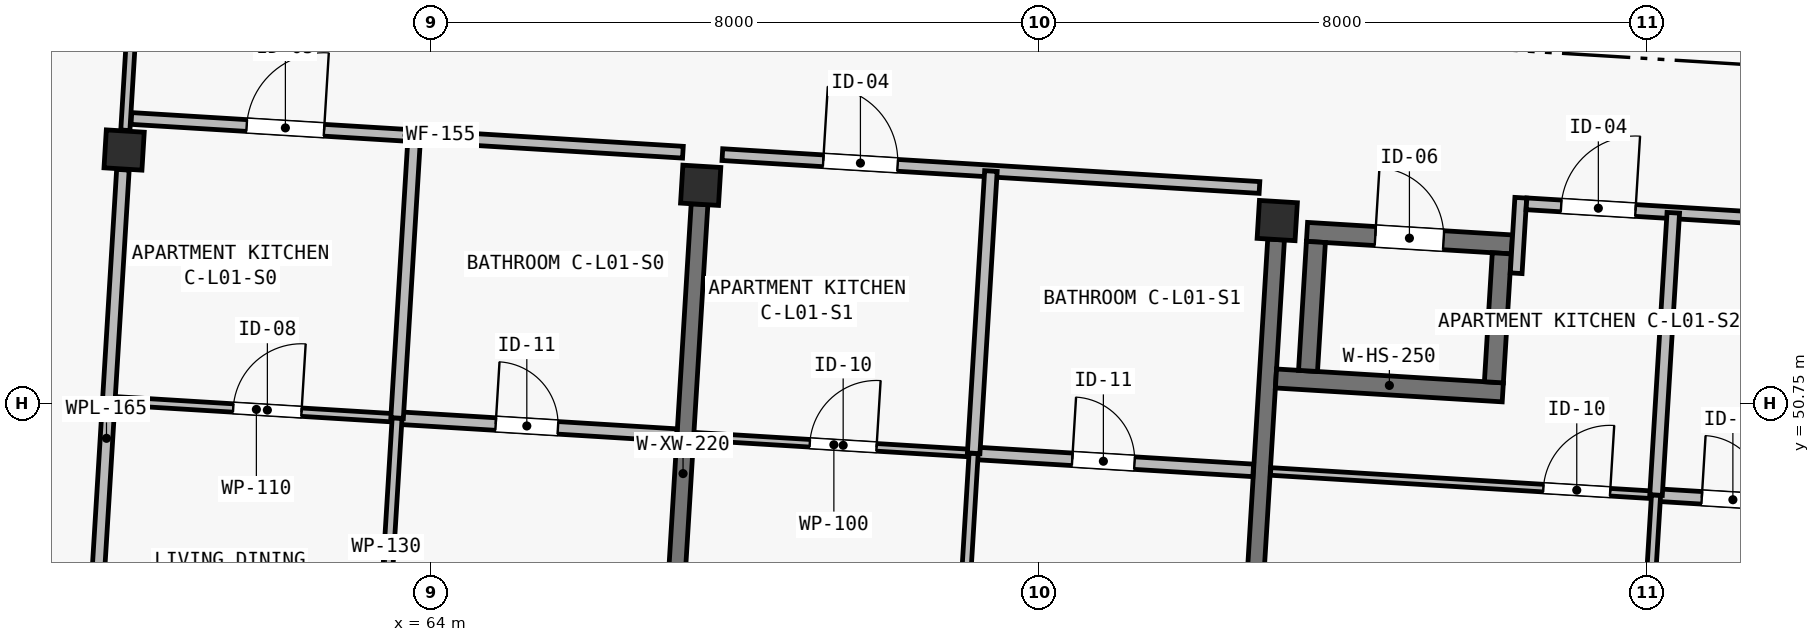
"""IFC4 building model, lengths in metres.
Left out: names, types, materials, properties, quantities, classifications, styles, units other than length and angle.
Written with IfcOpenShell. Run it as: python <this file> out.ifc"""

import sys

from ifc_helpers import new_model, si_unit, direction, frame, frame_2d, origin, origin_2d, place, context, subcontext, project, spatial, rectangle, extrude, element, fill, save


model = new_model("IFC4")
c1 = context("Model", 3, precision=1e-05, world=origin(), true_north=direction((0.0, 1.0)))
c2 = subcontext(c1, "Body", "Model", "MODEL_VIEW")
j1 = project(units=[si_unit("LENGTHUNIT", "METRE"), si_unit("PLANEANGLEUNIT", "RADIAN")], contexts=[c1])
p1 = place(None, origin())
s1 = spatial("IfcSite", under=j1, at=p1, CompositionType="ELEMENT")
p2 = place(p1, origin())
s2 = spatial("IfcBuilding", under=s1, at=p2, CompositionType="ELEMENT")
p3 = place(p2, frame((0.0, 0.0, 4.5)))
s3 = spatial("IfcBuildingStorey", under=s2, at=p3, CompositionType="ELEMENT", Elevation=4.5)
for number, where, z_axis, x_axis in (
    (1, (59.964, 54.086, 0.0), (0.0, 0.0, 1.0), (0.998, -0.061, 0.0)),
    (2, (67.55, 53.622, 0.0), (0.0, 0.0, 1.0), (0.998, -0.061, 0.0)),
    (3, (75.135, 53.158, 0.0), (0.0, 0.0, 1.0), (0.998, -0.061, 0.0)),
):
    element("IfcColumn", number, at=place(p3, frame(where, z_axis=z_axis, x_axis=x_axis)), inside=s3, PredefinedType="COLUMN", context=c2, shape_type="SweptSolid", body=[
        extrude(rectangle(XDim=0.5, YDim=0.5, at=origin_2d()), origin(), (0.0, 0.0, 1.0), 3.9),
    ])
p4 = place(p3, frame((67.101, 46.286, -0.25), z_axis=(0.0, 0.0, 1.0), x_axis=(0.061035953884, 0.998135568114, 0.0)))
e4 = element("IfcWall", 4, at=p4, inside=s3, PredefinedType="SHEAR", context=c2, shape_type="SweptSolid", body=[
    extrude(rectangle(XDim=7.1, YDim=0.22, at=frame_2d((3.55, 0.0))), origin(), (0.0, 0.0, 1.0), 3.4),
])
p5 = place(p3, frame((74.687, 45.822, -0.25), z_axis=(0.0, 0.0, 1.0), x_axis=(0.061033859059, 0.99813569621, 0.0)))
e5 = element("IfcWall", 5, at=p5, inside=s3, PredefinedType="SHEAR", context=c2, shape_type="SweptSolid", body=[
    extrude(rectangle(XDim=7.1, YDim=0.22, at=frame_2d((3.55, 0.0))), origin(), (0.0, 0.0, 1.0), 3.4),
])
p6 = place(p3, frame((75.119, 51.08, 0.0), z_axis=(0.0, 0.0, 1.0), x_axis=(0.998133370443, -0.061071882298, 0.0)))
e6 = element("IfcWall", 6, at=p6, inside=s3, PredefinedType="SHEAR", context=c2, shape_type="SweptSolid", body=[
    extrude(rectangle(XDim=2.99, YDim=0.25, at=frame_2d((1.495, 0.0))), origin(), (0.0, 0.0, 1.0), 3.9),
])
p7 = place(p3, frame((75.527, 53.009, 0.0), z_axis=(0.0, 0.0, 1.0), x_axis=(0.998129907752, -0.061128448781, 0.0)))
e7 = element("IfcWall", 7, at=p7, inside=s3, PredefinedType="SHEAR", context=c2, shape_type="SweptSolid", body=[
    extrude(rectangle(XDim=2.7, YDim=0.25, at=frame_2d((1.35, 0.0))), origin(), (0.0, 0.0, 1.0), 3.9),
])
p8 = place(p7, frame((0.9, 0.0, 0.0)))
e8 = element("IfcOpeningElement", 8, at=p8, cuts=e7, PredefinedType="OPENING", context=c2, shape_type="SweptSolid", body=[
    extrude(rectangle(XDim=0.9, YDim=2.05, at=frame_2d((0.45, 1.025))), frame((0.0, 0.14, 0.0), z_axis=(0.0, -1.0, 0.0), x_axis=(1.0, 0.0, 0.0)), (0.0, 0.0, 1.0), 0.28),
])
p9 = place(p3, frame((75.541, 51.179, 0.0), z_axis=(0.0, 0.0, 1.0), x_axis=(0.061037062968, 0.998135500293, 0.0)))
e9 = element("IfcWall", 9, at=p9, inside=s3, PredefinedType="SHEAR", context=c2, shape_type="SweptSolid", body=[
    extrude(rectangle(XDim=1.7, YDim=0.25, at=frame_2d((0.85, 0.0))), origin(), (0.0, 0.0, 1.0), 3.9),
])
p10 = place(p3, frame((77.986, 51.03, 0.0), z_axis=(0.0, 0.0, 1.0), x_axis=(0.061028314627, 0.998136035225, 0.0)))
e10 = element("IfcWall", 10, at=p10, inside=s3, PredefinedType="SHEAR", context=c2, shape_type="SweptSolid", body=[
    extrude(rectangle(XDim=1.7, YDim=0.25, at=frame_2d((0.85, 0.0))), origin(), (0.0, 0.0, 1.0), 3.9),
])
p11 = place(p3, frame((51.654, 49.585, 0.0), z_axis=(0.0, 0.0, 1.0), x_axis=(0.448621989068, 0.893721607059, 0.0)))
e11 = element("IfcWall", 11, at=p11, inside=s3, PredefinedType="SOLIDWALL", context=c2, shape_type="SweptSolid", body=[
    extrude(rectangle(XDim=19.061, YDim=0.26, at=frame_2d((9.53, 0.0))), origin(), (0.0, 0.0, 1.0), 3.65),
])
p12 = place(p11, frame((2.63, 0.0, 0.52)))
e12 = element("IfcOpeningElement", 12, at=p12, cuts=e11, PredefinedType="OPENING", context=c2, shape_type="SweptSolid", body=[
    extrude(rectangle(XDim=0.58, YDim=2.16, at=frame_2d((0.29, 1.08))), frame((0.0, 0.145, 0.0), z_axis=(0.0, -1.0, 0.0), x_axis=(1.0, 0.0, 0.0)), (0.0, 0.0, 1.0), 0.29),
])
p13 = place(p11, frame((15.35, 0.0, 0.45)))
e13 = element("IfcOpeningElement", 13, at=p13, cuts=e11, PredefinedType="OPENING", context=c2, shape_type="SweptSolid", body=[
    extrude(rectangle(XDim=0.72, YDim=2.16, at=frame_2d((0.36, 1.08))), frame((0.0, 0.145, 0.0), z_axis=(0.0, -1.0, 0.0), x_axis=(1.0, 0.0, 0.0)), (0.0, 0.0, 1.0), 0.29),
])
p14 = place(p3, frame((59.98, 54.345, 0.0), z_axis=(0.0, 0.0, 1.0), x_axis=(0.061101107425, 0.998131581843, 0.0)))
e14 = element("IfcWall", 14, at=p14, inside=s3, PredefinedType="PARTITIONING", context=c2, shape_type="SweptSolid", body=[
    extrude(rectangle(XDim=3.88, YDim=0.12, at=frame_2d((1.94, 0.0))), origin(), (0.0, 0.0, 1.0), 3.15),
])
p15 = place(p14, frame((1.35, 0.0, 0.0)))
e15 = element("IfcOpeningElement", 15, at=p15, cuts=e14, PredefinedType="OPENING", context=c2, shape_type="SweptSolid", body=[
    extrude(rectangle(XDim=0.88, YDim=2.1, at=frame_2d((0.44, 1.05))), frame((0.0, 0.075, 0.0), z_axis=(0.0, -1.0, 0.0), x_axis=(1.0, 0.0, 0.0)), (0.0, 0.0, 1.0), 0.15),
])
p16 = place(p3, frame((59.516, 46.76, 0.0), z_axis=(0.0, 0.0, 1.0), x_axis=(0.061034344288, 0.998135666539, 0.0)))
e16 = element("IfcWall", 16, at=p16, inside=s3, PredefinedType="PLUMBINGWALL", context=c2, shape_type="SweptSolid", body=[
    extrude(rectangle(XDim=7.08, YDim=0.165, at=frame_2d((3.54, 0.0))), origin(), (0.0, 0.0, 1.0), 3.15),
])
p17 = place(p3, frame((60.06, 54.501, 0.0), z_axis=(0.0, 0.0, 1.0), x_axis=(0.998134543433, -0.06105270843, 0.0)))
e17 = element("IfcWall", 17, at=p17, inside=s3, PredefinedType="PARTITIONING", context=c2, shape_type="SweptSolid", body=[
    extrude(rectangle(XDim=7.27, YDim=0.155, at=frame_2d((3.635, 0.0))), origin(), (0.0, 0.0, 1.0), 3.62),
])
p18 = place(p17, frame((1.52, 0.0, 0.0)))
e18 = element("IfcOpeningElement", 18, at=p18, cuts=e17, PredefinedType="OPENING", context=c2, shape_type="SweptSolid", body=[
    extrude(rectangle(XDim=1.02, YDim=2.2, at=frame_2d((0.51, 1.1))), frame((0.0, 0.093, 0.0), z_axis=(0.0, -1.0, 0.0), x_axis=(1.0, 0.0, 0.0)), (0.0, 0.0, 1.0), 0.185),
])
p19 = place(p3, frame((59.852, 50.786, 0.0), z_axis=(0.0, 0.0, 1.0), x_axis=(0.998137662841, -0.061001688651, 0.0)))
e19 = element("IfcWall", 19, at=p19, inside=s3, PredefinedType="PARTITIONING", context=c2, shape_type="SweptSolid", body=[
    extrude(rectangle(XDim=3.71, YDim=0.11, at=frame_2d((1.855, 0.0))), origin(), (0.0, 0.0, 1.0), 3.62),
])
p20 = place(p19, frame((1.55, 0.0, 0.0)))
e20 = element("IfcOpeningElement", 20, at=p20, cuts=e19, PredefinedType="OPENING", context=c2, shape_type="SweptSolid", body=[
    extrude(rectangle(XDim=0.9, YDim=2.1, at=frame_2d((0.45, 1.05))), frame((0.0, 0.07, 0.0), z_axis=(0.0, -1.0, 0.0), x_axis=(1.0, 0.0, 0.0)), (0.0, 0.0, 1.0), 0.14),
])
p21 = place(p3, frame((63.555, 50.56, 0.0), z_axis=(0.0, 0.0, 1.0), x_axis=(0.998132682596, -0.061083123148, 0.0)))
e21 = element("IfcWall", 21, at=p21, inside=s3, PredefinedType="PLUMBINGWALL", context=c2, shape_type="SweptSolid", body=[
    extrude(rectangle(XDim=3.685, YDim=0.165, at=frame_2d((1.843, 0.0))), origin(), (0.0, 0.0, 1.0), 3.62),
])
p22 = place(p21, frame((1.3, 0.0, 0.0)))
e22 = element("IfcOpeningElement", 22, at=p22, cuts=e21, PredefinedType="OPENING", context=c2, shape_type="SweptSolid", body=[
    extrude(rectangle(XDim=0.82, YDim=2.08, at=frame_2d((0.41, 1.04))), frame((0.0, 0.097, 0.0), z_axis=(0.0, -1.0, 0.0), x_axis=(1.0, 0.0, 0.0)), (0.0, 0.0, 1.0), 0.195),
])
p23 = place(p3, frame((63.269, 45.879, 0.0), z_axis=(0.0, 0.0, 1.0), x_axis=(0.061059262019, 0.998134142549, 0.0)))
e23 = element("IfcWall", 23, at=p23, inside=s3, PredefinedType="PARTITIONING", context=c2, shape_type="SweptSolid", body=[
    extrude(rectangle(XDim=4.69, YDim=0.13, at=frame_2d((2.345, 0.0))), origin(), (0.0, 0.0, 1.0), 3.62),
])
p24 = place(p23, frame((1.35, 0.0, 0.0)))
e24 = element("IfcOpeningElement", 24, at=p24, cuts=e23, PredefinedType="OPENING", context=c2, shape_type="SweptSolid", body=[
    extrude(rectangle(XDim=0.88, YDim=2.1, at=frame_2d((0.44, 1.05))), frame((0.0, 0.08, 0.0), z_axis=(0.0, -1.0, 0.0), x_axis=(1.0, 0.0, 0.0)), (0.0, 0.0, 1.0), 0.16),
])
p25 = place(p3, frame((63.555, 50.56, 0.0), z_axis=(0.0, 0.0, 1.0), x_axis=(0.061038003798, 0.998135442759, 0.0)))
e25 = element("IfcWall", 25, at=p25, inside=s3, PredefinedType="PLUMBINGWALL", context=c2, shape_type="SweptSolid", body=[
    extrude(rectangle(XDim=3.72, YDim=0.165, at=frame_2d((1.86, 0.0))), origin(), (0.0, 0.0, 1.0), 3.62),
])
p26 = place(p3, frame((67.835, 54.025, 0.0), z_axis=(0.0, 0.0, 1.0), x_axis=(0.998135666539, -0.061034344288, 0.0)))
e26 = element("IfcWall", 26, at=p26, inside=s3, PredefinedType="PARTITIONING", context=c2, shape_type="SweptSolid", body=[
    extrude(rectangle(XDim=7.08, YDim=0.155, at=frame_2d((3.54, 0.0))), origin(), (0.0, 0.0, 1.0), 3.62),
])
p27 = place(p26, frame((1.33, 0.0, 0.0)))
e27 = element("IfcOpeningElement", 27, at=p27, cuts=e26, PredefinedType="OPENING", context=c2, shape_type="SweptSolid", body=[
    extrude(rectangle(XDim=0.98, YDim=2.15, at=frame_2d((0.49, 1.075))), frame((0.0, 0.093, 0.0), z_axis=(0.0, -1.0, 0.0), x_axis=(1.0, 0.0, 0.0)), (0.0, 0.0, 1.0), 0.185),
])
p28 = place(p3, frame((67.463, 50.321, 0.0), z_axis=(0.0, 0.0, 1.0), x_axis=(0.998132682596, -0.061083123148, 0.0)))
e28 = element("IfcWall", 28, at=p28, inside=s3, PredefinedType="PARTITIONING", context=c2, shape_type="SweptSolid", body=[
    extrude(rectangle(XDim=3.685, YDim=0.1, at=frame_2d((1.843, 0.0))), origin(), (0.0, 0.0, 1.0), 3.62),
])
p29 = place(p28, frame((1.525, 0.0, 0.0)))
e29 = element("IfcOpeningElement", 29, at=p29, cuts=e28, PredefinedType="OPENING", context=c2, shape_type="SweptSolid", body=[
    extrude(rectangle(XDim=0.88, YDim=2.1, at=frame_2d((0.44, 1.05))), frame((0.0, 0.065, 0.0), z_axis=(0.0, -1.0, 0.0), x_axis=(1.0, 0.0, 0.0)), (0.0, 0.0, 1.0), 0.13),
])
p30 = place(p3, frame((71.141, 50.096, 0.0), z_axis=(0.0, 0.0, 1.0), x_axis=(0.998136472989, -0.061021154439, 0.0)))
e30 = element("IfcWall", 30, at=p30, inside=s3, PredefinedType="PLUMBINGWALL", context=c2, shape_type="SweptSolid", body=[
    extrude(rectangle(XDim=3.685, YDim=0.165, at=frame_2d((1.842, 0.0))), origin(), (0.0, 0.0, 1.0), 3.62),
])
p31 = place(p30, frame((1.3, 0.0, 0.0)))
e31 = element("IfcOpeningElement", 31, at=p31, cuts=e30, PredefinedType="OPENING", context=c2, shape_type="SweptSolid", body=[
    extrude(rectangle(XDim=0.82, YDim=2.08, at=frame_2d((0.41, 1.04))), frame((0.0, 0.097, 0.0), z_axis=(0.0, -1.0, 0.0), x_axis=(1.0, 0.0, 0.0)), (0.0, 0.0, 1.0), 0.195),
])
p32 = place(p3, frame((70.855, 45.415, 0.0), z_axis=(0.0, 0.0, 1.0), x_axis=(0.061062434628, 0.998133948465, 0.0)))
e32 = element("IfcWall", 32, at=p32, inside=s3, PredefinedType="PARTITIONING", context=c2, shape_type="SweptSolid", body=[
    extrude(rectangle(XDim=4.69, YDim=0.12, at=frame_2d((2.345, 0.0))), origin(), (0.0, 0.0, 1.0), 3.62),
])
p33 = place(p32, frame((1.35, 0.0, 0.0)))
e33 = element("IfcOpeningElement", 33, at=p33, cuts=e32, PredefinedType="OPENING", context=c2, shape_type="SweptSolid", body=[
    extrude(rectangle(XDim=0.9, YDim=2.1, at=frame_2d((0.45, 1.05))), frame((0.0, 0.075, 0.0), z_axis=(0.0, -1.0, 0.0), x_axis=(1.0, 0.0, 0.0)), (0.0, 0.0, 1.0), 0.15),
])
p34 = place(p3, frame((71.141, 50.096, 0.0), z_axis=(0.0, 0.0, 1.0), x_axis=(0.061034005467, 0.998135687257, 0.0)))
e34 = element("IfcWall", 34, at=p34, inside=s3, PredefinedType="PLUMBINGWALL", context=c2, shape_type="SweptSolid", body=[
    extrude(rectangle(XDim=3.72, YDim=0.165, at=frame_2d((1.86, 0.0))), origin(), (0.0, 0.0, 1.0), 3.62),
])
p35 = place(p3, frame((78.279, 52.465, 0.0), z_axis=(0.0, 0.0, 1.0), x_axis=(0.061095097219, 0.998131949742, 0.0)))
e35 = element("IfcWall", 35, at=p35, inside=s3, PredefinedType="PARTITIONING", context=c2, shape_type="SweptSolid", body=[
    extrude(rectangle(XDim=0.995, YDim=0.155, at=frame_2d((0.498, 0.0))), origin(), (0.0, 0.0, 1.0), 3.62),
])
p36 = place(p3, frame((78.415, 53.378, 0.0), z_axis=(0.0, 0.0, 1.0), x_axis=(0.998131852862, -0.061096679962, 0.0)))
e36 = element("IfcWall", 36, at=p36, inside=s3, PredefinedType="PARTITIONING", context=c2, shape_type="SweptSolid", body=[
    extrude(rectangle(XDim=4.08, YDim=0.155, at=frame_2d((2.04, 0.0))), origin(), (0.0, 0.0, 1.0), 3.62),
])
p37 = place(p36, frame((0.457, 0.0, 0.0)))
e37 = element("IfcOpeningElement", 37, at=p37, cuts=e36, PredefinedType="OPENING", context=c2, shape_type="SweptSolid", body=[
    extrude(rectangle(XDim=0.98, YDim=2.15, at=frame_2d((0.49, 1.075))), frame((0.0, 0.093, 0.0), z_axis=(0.0, -1.0, 0.0), x_axis=(1.0, 0.0, 0.0)), (0.0, 0.0, 1.0), 0.185),
])
p38 = place(p3, frame((75.049, 49.857, 0.0), z_axis=(0.0, 0.0, 1.0), x_axis=(0.998135637207, -0.061034823981, 0.0)))
e38 = element("IfcWall", 38, at=p38, inside=s3, PredefinedType="PARTITIONING", context=c2, shape_type="SweptSolid", body=[
    extrude(rectangle(XDim=5.08, YDim=0.1, at=frame_2d((2.54, 0.0))), origin(), (0.0, 0.0, 1.0), 3.62),
])
p39 = place(p38, frame((3.595, 0.0, 0.0)))
e39 = element("IfcOpeningElement", 39, at=p39, cuts=e38, PredefinedType="OPENING", context=c2, shape_type="SweptSolid", body=[
    extrude(rectangle(XDim=0.88, YDim=2.1, at=frame_2d((0.44, 1.05))), frame((0.0, 0.065, 0.0), z_axis=(0.0, -1.0, 0.0), x_axis=(1.0, 0.0, 0.0)), (0.0, 0.0, 1.0), 0.13),
])
p40 = place(p3, frame((80.119, 49.547, 0.0), z_axis=(0.0, 0.0, 1.0), x_axis=(0.99813262565, -0.061084053668, 0.0)))
e40 = element("IfcWall", 40, at=p40, inside=s3, PredefinedType="PLUMBINGWALL", context=c2, shape_type="SweptSolid", body=[
    extrude(rectangle(XDim=2.29, YDim=0.165, at=frame_2d((1.145, 0.0))), origin(), (0.0, 0.0, 1.0), 3.62),
])
p41 = place(p40, frame((0.603, 0.0, 0.0)))
e41 = element("IfcOpeningElement", 41, at=p41, cuts=e40, PredefinedType="OPENING", context=c2, shape_type="SweptSolid", body=[
    extrude(rectangle(XDim=0.82, YDim=2.08, at=frame_2d((0.41, 1.04))), frame((0.0, 0.097, 0.0), z_axis=(0.0, -1.0, 0.0), x_axis=(1.0, 0.0, 0.0)), (0.0, 0.0, 1.0), 0.195),
])
p42 = place(p3, frame((79.833, 44.866, 0.0), z_axis=(0.0, 0.0, 1.0), x_axis=(0.061010571843, 0.998137119901, 0.0)))
e42 = element("IfcWall", 42, at=p42, inside=s3, PredefinedType="PARTITIONING", context=c2, shape_type="SweptSolid", body=[
    extrude(rectangle(XDim=4.69, YDim=0.12, at=frame_2d((2.345, 0.0))), origin(), (0.0, 0.0, 1.0), 3.62),
])
p43 = place(p42, frame((1.35, 0.0, 0.0)))
e43 = element("IfcOpeningElement", 43, at=p43, cuts=e42, PredefinedType="OPENING", context=c2, shape_type="SweptSolid", body=[
    extrude(rectangle(XDim=0.9, YDim=2.1, at=frame_2d((0.45, 1.05))), frame((0.0, 0.075, 0.0), z_axis=(0.0, -1.0, 0.0), x_axis=(1.0, 0.0, 0.0)), (0.0, 0.0, 1.0), 0.15),
])
p44 = place(p3, frame((80.119, 49.547, 0.0), z_axis=(0.0, 0.0, 1.0), x_axis=(0.061099388563, 0.998131687062, 0.0)))
e44 = element("IfcWall", 44, at=p44, inside=s3, PredefinedType="PLUMBINGWALL", context=c2, shape_type="SweptSolid", body=[
    extrude(rectangle(XDim=3.72, YDim=0.165, at=frame_2d((1.86, 0.0))), origin(), (0.0, 0.0, 1.0), 3.62),
])
p45 = place(p18, origin())
e45 = element("IfcDoor", 45, at=p45, inside=s3, OperationType="SINGLE_SWING_RIGHT", PredefinedType="DOOR", context=c2, shape_type="SweptSolid", body=[
    extrude(rectangle(XDim=1.02, YDim=2.2, at=frame_2d((0.51, 1.1))), frame((0.0, 0.025, 0.0), z_axis=(0.0, -1.0, 0.0), x_axis=(1.0, 0.0, 0.0)), (0.0, 0.0, 1.0), 0.05),
])
fill(e18, e45)
p46 = place(p20, origin())
e46 = element("IfcDoor", 46, at=p46, inside=s3, OperationType="SINGLE_SWING_RIGHT", PredefinedType="DOOR", context=c2, shape_type="SweptSolid", body=[
    extrude(rectangle(XDim=0.9, YDim=2.1, at=frame_2d((0.45, 1.05))), frame((0.0, 0.025, 0.0), z_axis=(0.0, -1.0, 0.0), x_axis=(1.0, 0.0, 0.0)), (0.0, 0.0, 1.0), 0.05),
])
fill(e20, e46)
p47 = place(p22, origin())
e47 = element("IfcDoor", 47, at=p47, inside=s3, OperationType="SINGLE_SWING_LEFT", PredefinedType="DOOR", context=c2, shape_type="SweptSolid", body=[
    extrude(rectangle(XDim=0.82, YDim=2.08, at=frame_2d((0.41, 1.04))), frame((0.0, 0.025, 0.0), z_axis=(0.0, -1.0, 0.0), x_axis=(1.0, 0.0, 0.0)), (0.0, 0.0, 1.0), 0.05),
])
fill(e22, e47)
p48 = place(p27, origin())
e48 = element("IfcDoor", 48, at=p48, inside=s3, OperationType="SINGLE_SWING_LEFT", PredefinedType="DOOR", context=c2, shape_type="SweptSolid", body=[
    extrude(rectangle(XDim=0.98, YDim=2.15, at=frame_2d((0.49, 1.075))), frame((0.0, 0.025, 0.0), z_axis=(0.0, -1.0, 0.0), x_axis=(1.0, 0.0, 0.0)), (0.0, 0.0, 1.0), 0.05),
])
fill(e27, e48)
p49 = place(p29, origin())
e49 = element("IfcDoor", 49, at=p49, inside=s3, OperationType="SINGLE_SWING_RIGHT", PredefinedType="DOOR", context=c2, shape_type="SweptSolid", body=[
    extrude(rectangle(XDim=0.88, YDim=2.1, at=frame_2d((0.44, 1.05))), frame((0.0, 0.025, 0.0), z_axis=(0.0, -1.0, 0.0), x_axis=(1.0, 0.0, 0.0)), (0.0, 0.0, 1.0), 0.05),
])
fill(e29, e49)
p50 = place(p31, origin())
e50 = element("IfcDoor", 50, at=p50, inside=s3, OperationType="SINGLE_SWING_LEFT", PredefinedType="DOOR", context=c2, shape_type="SweptSolid", body=[
    extrude(rectangle(XDim=0.82, YDim=2.08, at=frame_2d((0.41, 1.04))), frame((0.0, 0.025, 0.0), z_axis=(0.0, -1.0, 0.0), x_axis=(1.0, 0.0, 0.0)), (0.0, 0.0, 1.0), 0.05),
])
fill(e31, e50)
p51 = place(p37, origin())
e51 = element("IfcDoor", 51, at=p51, inside=s3, OperationType="SINGLE_SWING_RIGHT", PredefinedType="DOOR", context=c2, shape_type="SweptSolid", body=[
    extrude(rectangle(XDim=0.98, YDim=2.15, at=frame_2d((0.49, 1.075))), frame((0.0, 0.025, 0.0), z_axis=(0.0, -1.0, 0.0), x_axis=(1.0, 0.0, 0.0)), (0.0, 0.0, 1.0), 0.05),
])
fill(e37, e51)
p52 = place(p39, origin())
e52 = element("IfcDoor", 52, at=p52, inside=s3, OperationType="SINGLE_SWING_RIGHT", PredefinedType="DOOR", context=c2, shape_type="SweptSolid", body=[
    extrude(rectangle(XDim=0.88, YDim=2.1, at=frame_2d((0.44, 1.05))), frame((0.0, 0.025, 0.0), z_axis=(0.0, -1.0, 0.0), x_axis=(1.0, 0.0, 0.0)), (0.0, 0.0, 1.0), 0.05),
])
fill(e39, e52)
p53 = place(p41, origin())
e53 = element("IfcDoor", 53, at=p53, inside=s3, OperationType="SINGLE_SWING_LEFT", PredefinedType="DOOR", context=c2, shape_type="SweptSolid", body=[
    extrude(rectangle(XDim=0.82, YDim=2.08, at=frame_2d((0.41, 1.04))), frame((0.0, 0.025, 0.0), z_axis=(0.0, -1.0, 0.0), x_axis=(1.0, 0.0, 0.0)), (0.0, 0.0, 1.0), 0.05),
])
fill(e41, e53)
p54 = place(p8, origin())
e54 = element("IfcDoor", 54, at=p54, inside=s3, OperationType="SINGLE_SWING_LEFT", PredefinedType="DOOR", context=c2, shape_type="SweptSolid", body=[
    extrude(rectangle(XDim=0.9, YDim=2.05, at=frame_2d((0.45, 1.025))), frame((0.0, 0.025, 0.0), z_axis=(0.0, -1.0, 0.0), x_axis=(1.0, 0.0, 0.0)), (0.0, 0.0, 1.0), 0.05),
])
fill(e8, e54)
save(model, sys.argv[1])
